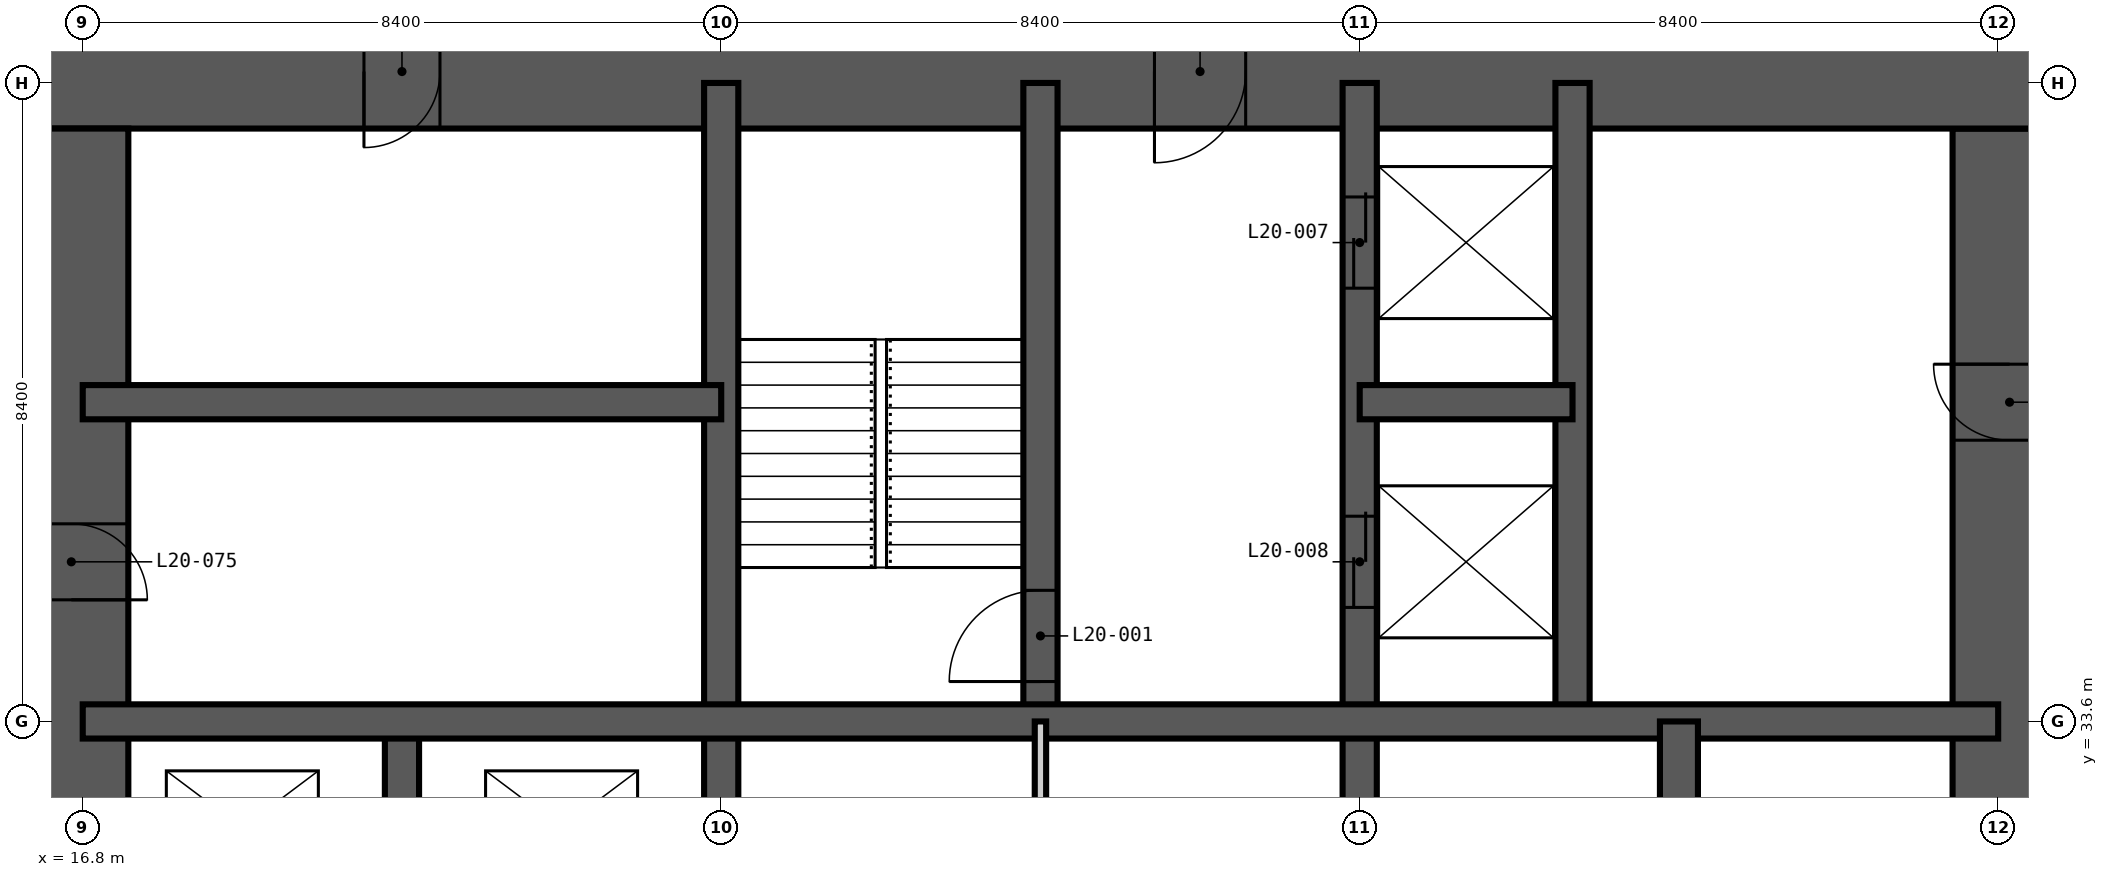
"""IFC4 building model, lengths in metres.
Left out: names, types, materials, properties, quantities, classifications, styles, units other than length and angle.
Written with IfcOpenShell. Run it as: python <this file> out.ifc"""

import sys

from ifc_helpers import new_model, si_unit, direction, frame, frame_2d, origin, place, context, subcontext, project, spatial, rectangle, extrude, element, fill, save


model = new_model("IFC4")
c1 = context("Model", 3, precision=1e-05, world=origin(), true_north=direction((0.0, 1.0)))
c2 = subcontext(c1, "Body", "Model", "MODEL_VIEW")
j1 = project(units=[si_unit("LENGTHUNIT", "METRE"), si_unit("PLANEANGLEUNIT", "RADIAN")], contexts=[c1])
p1 = place(None, origin())
s1 = spatial("IfcSite", under=j1, at=p1, CompositionType="ELEMENT")
p2 = place(p1, origin())
s2 = spatial("IfcBuilding", under=s1, at=p2, CompositionType="ELEMENT")
p3 = place(p2, frame((0.0, 0.0, 81.0)))
s3 = spatial("IfcBuildingStorey", under=s2, at=p3, CompositionType="ELEMENT", Elevation=81.0)
p4 = place(p3, frame((42.15, 17.4, -0.35), z_axis=(0.0, 0.0, 1.0), x_axis=(0.0, 1.0, 0.0)))
e1 = element("IfcWall", 1, at=p4, inside=s3, PredefinedType="SHEAR", context=c2, shape_type="SweptSolid", body=[
    extrude(rectangle(XDim=24.0, YDim=1.5, at=frame_2d((12.0, 0.0))), origin(), (0.0, 0.0, 1.0), 3.6),
])
p5 = place(p4, frame((0.2, 0.0, 0.35)))
e2 = element("IfcOpeningElement", 2, at=p5, cuts=e1, PredefinedType="OPENING", context=c2, shape_type="SweptSolid", body=[
    extrude(rectangle(XDim=1.2, YDim=2.2, at=frame_2d((0.6, 1.1))), frame((0.0, 0.76, 0.0), z_axis=(0.0, -1.0, 0.0), x_axis=(1.0, 0.0, 0.0)), (0.0, 0.0, 1.0), 1.52),
])
p6 = place(p4, frame((11.5, 0.0, 0.35)))
e3 = element("IfcOpeningElement", 3, at=p6, cuts=e1, PredefinedType="OPENING", context=c2, shape_type="SweptSolid", body=[
    extrude(rectangle(XDim=1.0, YDim=2.1, at=frame_2d((0.5, 1.05))), frame((0.0, 0.76, 0.0), z_axis=(0.0, -1.0, 0.0), x_axis=(1.0, 0.0, 0.0)), (0.0, 0.0, 1.0), 1.52),
])
p7 = place(p4, frame((19.9, 0.0, 0.35)))
e4 = element("IfcOpeningElement", 4, at=p7, cuts=e1, PredefinedType="OPENING", context=c2, shape_type="SweptSolid", body=[
    extrude(rectangle(XDim=1.0, YDim=2.1, at=frame_2d((0.5, 1.05))), frame((0.0, 0.76, 0.0), z_axis=(0.0, -1.0, 0.0), x_axis=(1.0, 0.0, 0.0)), (0.0, 0.0, 1.0), 1.52),
])
p8 = place(p3, frame((42.9, 42.15, -0.35), z_axis=(0.0, 0.0, 1.0), x_axis=(-1.0, 0.0, 0.0)))
e5 = element("IfcWall", 5, at=p8, inside=s3, PredefinedType="SHEAR", context=c2, shape_type="SweptSolid", body=[
    extrude(rectangle(XDim=27.0, YDim=1.5, at=frame_2d((13.5, 0.0))), origin(), (0.0, 0.0, 1.0), 3.6),
])
p9 = place(p8, frame((21.4, 0.0, 0.35)))
e6 = element("IfcOpeningElement", 6, at=p9, cuts=e5, PredefinedType="OPENING", context=c2, shape_type="SweptSolid", body=[
    extrude(rectangle(XDim=1.0, YDim=2.1, at=frame_2d((0.5, 1.05))), frame((0.0, 0.76, 0.0), z_axis=(0.0, -1.0, 0.0), x_axis=(1.0, 0.0, 0.0)), (0.0, 0.0, 1.0), 1.52),
])
p10 = place(p8, frame((10.8, 0.0, 0.35)))
e7 = element("IfcOpeningElement", 7, at=p10, cuts=e5, PredefinedType="OPENING", context=c2, shape_type="SweptSolid", body=[
    extrude(rectangle(XDim=1.2, YDim=2.2, at=frame_2d((0.6, 1.1))), frame((0.0, 0.76, 0.0), z_axis=(0.0, -1.0, 0.0), x_axis=(1.0, 0.0, 0.0)), (0.0, 0.0, 1.0), 1.52),
])
p11 = place(p3, frame((16.65, 41.4, -0.35), z_axis=(0.0, 0.0, 1.0), x_axis=(0.0, -1.0, 0.0)))
e8 = element("IfcWall", 8, at=p11, inside=s3, PredefinedType="SHEAR", context=c2, shape_type="SweptSolid", body=[
    extrude(rectangle(XDim=24.0, YDim=1.5, at=frame_2d((12.0, 0.0))), origin(), (0.0, 0.0, 1.0), 3.6),
])
p12 = place(p11, frame((11.1, 0.0, 0.35)))
e9 = element("IfcOpeningElement", 9, at=p12, cuts=e8, PredefinedType="OPENING", context=c2, shape_type="SweptSolid", body=[
    extrude(rectangle(XDim=1.8, YDim=2.2, at=frame_2d((0.9, 1.1))), frame((0.0, 0.76, 0.0), z_axis=(0.0, -1.0, 0.0), x_axis=(1.0, 0.0, 0.0)), (0.0, 0.0, 1.0), 1.52),
])
p13 = place(p11, frame((19.9, 0.0, 0.35)))
e10 = element("IfcOpeningElement", 10, at=p13, cuts=e8, PredefinedType="OPENING", context=c2, shape_type="SweptSolid", body=[
    extrude(rectangle(XDim=1.0, YDim=2.1, at=frame_2d((0.5, 1.05))), frame((0.0, 0.76, 0.0), z_axis=(0.0, -1.0, 0.0), x_axis=(1.0, 0.0, 0.0)), (0.0, 0.0, 1.0), 1.52),
])
p14 = place(p11, frame((5.2, 0.0, 0.35)))
e11 = element("IfcOpeningElement", 11, at=p14, cuts=e8, PredefinedType="OPENING", context=c2, shape_type="SweptSolid", body=[
    extrude(rectangle(XDim=1.0, YDim=2.1, at=frame_2d((0.5, 1.05))), frame((0.0, 0.76, 0.0), z_axis=(0.0, -1.0, 0.0), x_axis=(1.0, 0.0, 0.0)), (0.0, 0.0, 1.0), 1.52),
])
p15 = place(p3, frame((21.0, 30.8, -0.35), z_axis=(0.0, 0.0, 1.0), x_axis=(0.0, 1.0, 0.0)))
e12 = element("IfcWall", 12, at=p15, inside=s3, PredefinedType="SHEAR", context=c2, shape_type="SweptSolid", body=[
    extrude(rectangle(XDim=2.8, YDim=0.45, at=frame_2d((1.4, 0.0))), origin(), (0.0, 0.0, 1.0), 3.6),
])
p16 = place(p3, frame((25.2, 16.8, -0.35), z_axis=(0.0, 0.0, 1.0), x_axis=(0.0, 1.0, 0.0)))
e13 = element("IfcWall", 13, at=p16, inside=s3, PredefinedType="SHEAR", context=c2, shape_type="SweptSolid", body=[
    extrude(rectangle(XDim=25.2, YDim=0.45, at=frame_2d((12.6, 0.0))), origin(), (0.0, 0.0, 1.0), 3.6),
])
p17 = place(p3, frame((29.4, 33.6, -0.35), z_axis=(0.0, 0.0, 1.0), x_axis=(0.0, 1.0, 0.0)))
e14 = element("IfcWall", 14, at=p17, inside=s3, PredefinedType="SHEAR", context=c2, shape_type="SweptSolid", body=[
    extrude(rectangle(XDim=8.4, YDim=0.45, at=frame_2d((4.2, 0.0))), origin(), (0.0, 0.0, 1.0), 3.6),
])
p18 = place(p17, frame((0.525, 0.0, 0.35)))
e15 = element("IfcOpeningElement", 15, at=p18, cuts=e14, PredefinedType="OPENING", context=c2, shape_type="SweptSolid", body=[
    extrude(rectangle(XDim=1.2, YDim=2.2, at=frame_2d((0.6, 1.1))), frame((0.0, 0.235, 0.0), z_axis=(0.0, -1.0, 0.0), x_axis=(1.0, 0.0, 0.0)), (0.0, 0.0, 1.0), 0.47),
])
p19 = place(p3, frame((33.6, 16.8, -0.35), z_axis=(0.0, 0.0, 1.0), x_axis=(0.0, 1.0, 0.0)))
e16 = element("IfcWall", 16, at=p19, inside=s3, PredefinedType="SHEAR", context=c2, shape_type="SweptSolid", body=[
    extrude(rectangle(XDim=25.2, YDim=0.45, at=frame_2d((12.6, 0.0))), origin(), (0.0, 0.0, 1.0), 3.6),
])
p20 = place(p19, frame((22.5, 0.0, 0.35)))
e17 = element("IfcOpeningElement", 17, at=p20, cuts=e16, PredefinedType="OPENING", context=c2, shape_type="SweptSolid", body=[
    extrude(rectangle(XDim=1.2, YDim=2.2, at=frame_2d((0.6, 1.1))), frame((0.0, 0.235, 0.0), z_axis=(0.0, -1.0, 0.0), x_axis=(1.0, 0.0, 0.0)), (0.0, 0.0, 1.0), 0.47),
])
p21 = place(p19, frame((18.3, 0.0, 0.35)))
e18 = element("IfcOpeningElement", 18, at=p21, cuts=e16, PredefinedType="OPENING", context=c2, shape_type="SweptSolid", body=[
    extrude(rectangle(XDim=1.2, YDim=2.2, at=frame_2d((0.6, 1.1))), frame((0.0, 0.235, 0.0), z_axis=(0.0, -1.0, 0.0), x_axis=(1.0, 0.0, 0.0)), (0.0, 0.0, 1.0), 0.47),
])
p22 = place(p19, frame((12.1, 0.0, 0.35)))
e19 = element("IfcOpeningElement", 19, at=p22, cuts=e16, PredefinedType="OPENING", context=c2, shape_type="SweptSolid", body=[
    extrude(rectangle(XDim=1.0, YDim=2.1, at=frame_2d((0.5, 1.05))), frame((0.0, 0.235, 0.0), z_axis=(0.0, -1.0, 0.0), x_axis=(1.0, 0.0, 0.0)), (0.0, 0.0, 1.0), 0.47),
])
p23 = place(p3, frame((36.4, 33.6, -0.35), z_axis=(0.0, 0.0, 1.0), x_axis=(0.0, 1.0, 0.0)))
e20 = element("IfcWall", 20, at=p23, inside=s3, PredefinedType="SHEAR", context=c2, shape_type="SweptSolid", body=[
    extrude(rectangle(XDim=8.4, YDim=0.45, at=frame_2d((4.2, 0.0))), origin(), (0.0, 0.0, 1.0), 3.6),
])
p24 = place(p3, frame((16.8, 33.6, -0.35), z_axis=(0.0, 0.0, 1.0), x_axis=(1.0, 0.0, 0.0)))
e21 = element("IfcWall", 21, at=p24, inside=s3, PredefinedType="SHEAR", context=c2, shape_type="SweptSolid", body=[
    extrude(rectangle(XDim=25.2, YDim=0.45, at=frame_2d((12.6, 0.0))), origin(), (0.0, 0.0, 1.0), 3.6),
])
p25 = place(p3, frame((16.8, 37.8, -0.35), z_axis=(0.0, 0.0, 1.0), x_axis=(1.0, 0.0, 0.0)))
e22 = element("IfcWall", 22, at=p25, inside=s3, PredefinedType="SHEAR", context=c2, shape_type="SweptSolid", body=[
    extrude(rectangle(XDim=8.4, YDim=0.45, at=frame_2d((4.2, 0.0))), origin(), (0.0, 0.0, 1.0), 3.6),
])
p26 = place(p3, frame((33.6, 37.8, -0.35), z_axis=(0.0, 0.0, 1.0), x_axis=(1.0, 0.0, 0.0)))
e23 = element("IfcWall", 23, at=p26, inside=s3, PredefinedType="SHEAR", context=c2, shape_type="SweptSolid", body=[
    extrude(rectangle(XDim=2.8, YDim=0.45, at=frame_2d((1.4, 0.0))), origin(), (0.0, 0.0, 1.0), 3.6),
])
p27 = place(p3, frame((37.8, 30.8, -0.35), z_axis=(0.0, 0.0, 1.0), x_axis=(0.0, 1.0, 0.0)))
e24 = element("IfcWall", 24, at=p27, inside=s3, PredefinedType="SHEAR", context=c2, shape_type="SweptSolid", body=[
    extrude(rectangle(XDim=2.8, YDim=0.5, at=frame_2d((1.4, 0.0))), origin(), (0.0, 0.0, 1.0), 3.6),
])
p28 = place(p3, frame((29.4, 25.2, 0.0), z_axis=(0.0, 0.0, 1.0), x_axis=(0.0, 1.0, 0.0)))
e25 = element("IfcWall", 25, at=p28, inside=s3, PredefinedType="PARTITIONING", context=c2, shape_type="SweptSolid", body=[
    extrude(rectangle(XDim=8.4, YDim=0.15, at=frame_2d((4.2, 0.0))), origin(), (0.0, 0.0, 1.0), 3.25),
])
p29 = place(p28, frame((3.7, 0.0, 0.0)))
e26 = element("IfcOpeningElement", 26, at=p29, cuts=e25, PredefinedType="OPENING", context=c2, shape_type="SweptSolid", body=[
    extrude(rectangle(XDim=1.0, YDim=2.1, at=frame_2d((0.5, 1.05))), frame((0.0, 0.085, 0.0), z_axis=(0.0, -1.0, 0.0), x_axis=(1.0, 0.0, 0.0)), (0.0, 0.0, 1.0), 0.17),
])
p30 = place(p18, origin())
e27 = element("IfcDoor", 27, at=p30, inside=s3, OperationType="SINGLE_SWING_LEFT", PredefinedType="DOOR", context=c2, shape_type="SweptSolid", body=[
    extrude(rectangle(XDim=1.2, YDim=2.2, at=frame_2d((0.6, 1.1))), frame((0.0, 0.025, 0.0), z_axis=(0.0, -1.0, 0.0), x_axis=(1.0, 0.0, 0.0)), (0.0, 0.0, 1.0), 0.05),
])
fill(e15, e27)
p31 = place(p20, origin())
e28 = element("IfcDoor", 28, at=p31, inside=s3, OperationType="DOUBLE_DOOR_SLIDING", PredefinedType="DOOR", context=c2, shape_type="SweptSolid", body=[
    extrude(rectangle(XDim=1.2, YDim=2.2, at=frame_2d((0.6, 1.1))), frame((0.0, 0.025, 0.0), z_axis=(0.0, -1.0, 0.0), x_axis=(1.0, 0.0, 0.0)), (0.0, 0.0, 1.0), 0.05),
])
fill(e17, e28)
p32 = place(p21, origin())
e29 = element("IfcDoor", 29, at=p32, inside=s3, OperationType="DOUBLE_DOOR_SLIDING", PredefinedType="DOOR", context=c2, shape_type="SweptSolid", body=[
    extrude(rectangle(XDim=1.2, YDim=2.2, at=frame_2d((0.6, 1.1))), frame((0.0, 0.025, 0.0), z_axis=(0.0, -1.0, 0.0), x_axis=(1.0, 0.0, 0.0)), (0.0, 0.0, 1.0), 0.05),
])
fill(e18, e29)
p33 = place(p14, origin())
e30 = element("IfcDoor", 30, at=p33, inside=s3, OperationType="SINGLE_SWING_RIGHT", PredefinedType="DOOR", context=c2, shape_type="SweptSolid", body=[
    extrude(rectangle(XDim=1.0, YDim=2.1, at=frame_2d((0.5, 1.05))), frame((0.0, 0.025, 0.0), z_axis=(0.0, -1.0, 0.0), x_axis=(1.0, 0.0, 0.0)), (0.0, 0.0, 1.0), 0.05),
])
fill(e11, e30)
p34 = place(p9, origin())
e31 = element("IfcDoor", 31, at=p34, inside=s3, OperationType="SINGLE_SWING_RIGHT", PredefinedType="DOOR", context=c2, shape_type="SweptSolid", body=[
    extrude(rectangle(XDim=1.0, YDim=2.1, at=frame_2d((0.5, 1.05))), frame((0.0, 0.025, 0.0), z_axis=(0.0, -1.0, 0.0), x_axis=(1.0, 0.0, 0.0)), (0.0, 0.0, 1.0), 0.05),
])
fill(e6, e31)
p35 = place(p10, origin())
e32 = element("IfcDoor", 32, at=p35, inside=s3, OperationType="SINGLE_SWING_RIGHT", PredefinedType="DOOR", context=c2, shape_type="SweptSolid", body=[
    extrude(rectangle(XDim=1.2, YDim=2.2, at=frame_2d((0.6, 1.1))), frame((0.0, 0.025, 0.0), z_axis=(0.0, -1.0, 0.0), x_axis=(1.0, 0.0, 0.0)), (0.0, 0.0, 1.0), 0.05),
])
fill(e7, e32)
p36 = place(p7, origin())
e33 = element("IfcDoor", 33, at=p36, inside=s3, OperationType="SINGLE_SWING_RIGHT", PredefinedType="DOOR", context=c2, shape_type="SweptSolid", body=[
    extrude(rectangle(XDim=1.0, YDim=2.1, at=frame_2d((0.5, 1.05))), frame((0.0, 0.025, 0.0), z_axis=(0.0, -1.0, 0.0), x_axis=(1.0, 0.0, 0.0)), (0.0, 0.0, 1.0), 0.05),
])
fill(e4, e33)
save(model, sys.argv[1])
